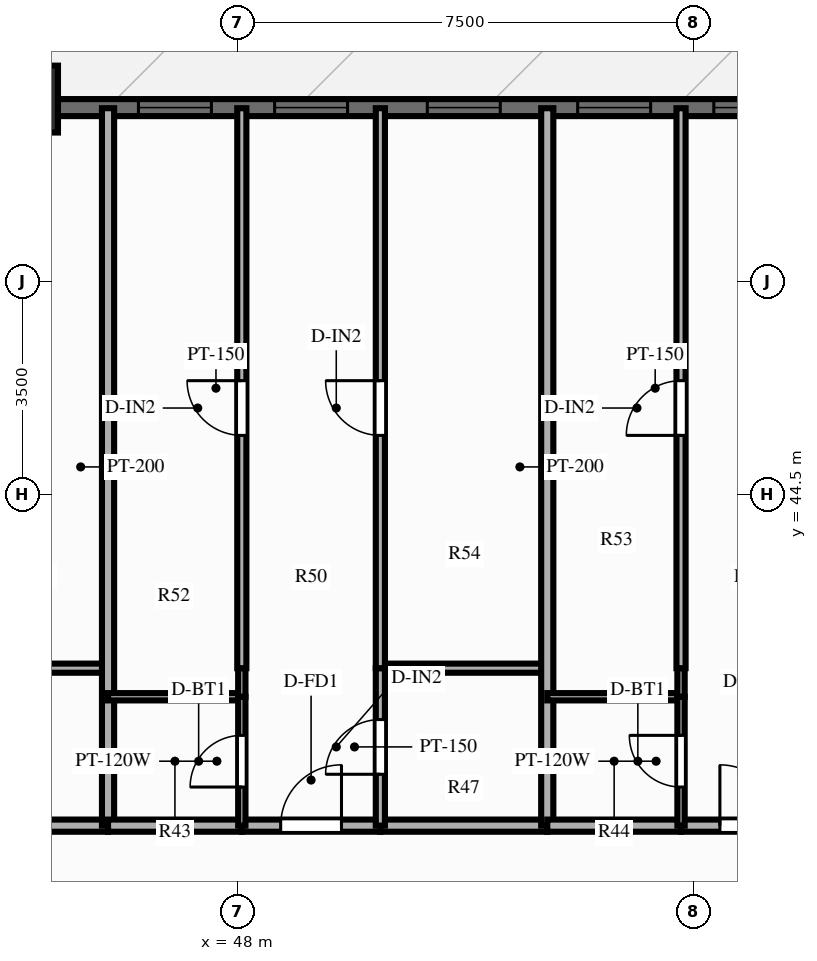
"""IFC4 building model, lengths in metres.
Left out: names, types, materials, properties, quantities, classifications, styles, units other than length and angle.
Written with IfcOpenShell. Run it as: python <this file> out.ifc"""

import sys

from ifc_helpers import new_model, si_unit, direction, frame, frame_2d, origin, origin_2d, place, context, subcontext, project, spatial, rectangle, extrude, source, transform, mapped, element, fill, save


model = new_model("IFC4")
c1 = context("Model", 3, precision=1e-05, world=origin(), true_north=direction((0.0, 1.0)))
c2 = subcontext(c1, "Body", "Model", "MODEL_VIEW")
j1 = project(units=[si_unit("LENGTHUNIT", "METRE"), si_unit("PLANEANGLEUNIT", "RADIAN")], contexts=[c1])
p1 = place(None, origin())
s1 = spatial("IfcSite", under=j1, at=p1, CompositionType="ELEMENT")
p2 = place(p1, origin())
s2 = spatial("IfcBuilding", under=s1, at=p2, CompositionType="ELEMENT")
p3 = place(p2, frame((0.0, 0.0, 25.4)))
s3 = spatial("IfcBuildingStorey", under=s2, at=p3, CompositionType="ELEMENT", Elevation=25.4)
m1 = source(origin(), c2, "Body", "SweptSolid", [
    extrude(rectangle(XDim=1.1, YDim=1.1, at=origin_2d()), origin(), (0.0, 0.0, 1.0), 3.0),
])
p4 = place(p3, frame((44.5, 51.0, 0.0), z_axis=(0.0, 0.0, 1.0), x_axis=(1.0, 0.0, 0.0)))
e1 = element("IfcColumn", 1, at=p4, inside=s3, PredefinedType="COLUMN", context=c2, shape_type="MappedRepresentation", body=[
    mapped(m1, transform((0.0, 0.0, 0.0), scale=1.0)),
])
p5 = place(p3, frame((15.5, 50.86, 0.0), z_axis=(0.0, 0.0, 1.0), x_axis=(1.0, 0.0, 0.0)))
e2 = element("IfcWall", 2, at=p5, inside=s3, PredefinedType="SOLIDWALL", context=c2, shape_type="SweptSolid", body=[
    extrude(rectangle(XDim=45.0, YDim=0.28, at=frame_2d((22.5, 0.0))), origin(), (0.0, 0.0, 1.0), 2.28),
])
p6 = place(p5, frame((0.76, 0.0, 0.25)))
e3 = element("IfcOpeningElement", 3, at=p6, cuts=e2, PredefinedType="OPENING", context=c2, shape_type="SweptSolid", body=[
    extrude(rectangle(XDim=1.2, YDim=1.5, at=frame_2d((0.6, 0.75))), frame((0.0, 0.152, 0.0), z_axis=(0.0, -1.0, 0.0), x_axis=(1.0, 0.0, 0.0)), (0.0, 0.0, 1.0), 0.304),
])
p7 = place(p5, frame((3.494, 0.0, 0.25)))
e4 = element("IfcOpeningElement", 4, at=p7, cuts=e2, PredefinedType="OPENING", context=c2, shape_type="SweptSolid", body=[
    extrude(rectangle(XDim=1.2, YDim=1.5, at=frame_2d((0.6, 0.75))), frame((0.0, 0.152, 0.0), z_axis=(0.0, -1.0, 0.0), x_axis=(1.0, 0.0, 0.0)), (0.0, 0.0, 1.0), 0.304),
])
p8 = place(p5, frame((8.741, 0.0, 0.25)))
e5 = element("IfcOpeningElement", 5, at=p8, cuts=e2, PredefinedType="OPENING", context=c2, shape_type="SweptSolid", body=[
    extrude(rectangle(XDim=1.2, YDim=1.5, at=frame_2d((0.6, 0.75))), frame((0.0, 0.152, 0.0), z_axis=(0.0, -1.0, 0.0), x_axis=(1.0, 0.0, 0.0)), (0.0, 0.0, 1.0), 0.304),
])
p9 = place(p5, frame((13.616, 0.0, 0.25)))
e6 = element("IfcOpeningElement", 6, at=p9, cuts=e2, PredefinedType="OPENING", context=c2, shape_type="SweptSolid", body=[
    extrude(rectangle(XDim=1.2, YDim=1.5, at=frame_2d((0.6, 0.75))), frame((0.0, 0.152, 0.0), z_axis=(0.0, -1.0, 0.0), x_axis=(1.0, 0.0, 0.0)), (0.0, 0.0, 1.0), 0.304),
])
p10 = place(p5, frame((17.146, 0.0, 0.25)))
e7 = element("IfcOpeningElement", 7, at=p10, cuts=e2, PredefinedType="OPENING", context=c2, shape_type="SweptSolid", body=[
    extrude(rectangle(XDim=1.2, YDim=1.5, at=frame_2d((0.6, 0.75))), frame((0.0, 0.152, 0.0), z_axis=(0.0, -1.0, 0.0), x_axis=(1.0, 0.0, 0.0)), (0.0, 0.0, 1.0), 0.304),
])
p11 = place(p5, frame((22.423, 0.0, 0.0)))
e8 = element("IfcOpeningElement", 8, at=p11, cuts=e2, PredefinedType="OPENING", context=c2, shape_type="SweptSolid", body=[
    extrude(rectangle(XDim=1.1, YDim=2.15, at=frame_2d((0.55, 1.075))), frame((0.0, 0.152, 0.0), z_axis=(0.0, -1.0, 0.0), x_axis=(1.0, 0.0, 0.0)), (0.0, 0.0, 1.0), 0.304),
])
p12 = place(p5, frame((27.252, 0.0, 0.25)))
e9 = element("IfcOpeningElement", 9, at=p12, cuts=e2, PredefinedType="OPENING", context=c2, shape_type="SweptSolid", body=[
    extrude(rectangle(XDim=0.95, YDim=1.5, at=frame_2d((0.475, 0.75))), frame((0.0, 0.152, 0.0), z_axis=(0.0, -1.0, 0.0), x_axis=(1.0, 0.0, 0.0)), (0.0, 0.0, 1.0), 0.304),
])
p13 = place(p5, frame((30.873, 0.0, 0.25)))
e10 = element("IfcOpeningElement", 10, at=p13, cuts=e2, PredefinedType="OPENING", context=c2, shape_type="SweptSolid", body=[
    extrude(rectangle(XDim=1.2, YDim=1.5, at=frame_2d((0.6, 0.75))), frame((0.0, 0.152, 0.0), z_axis=(0.0, -1.0, 0.0), x_axis=(1.0, 0.0, 0.0)), (0.0, 0.0, 1.0), 0.304),
])
p14 = place(p5, frame((33.113, 0.0, 0.25)))
e11 = element("IfcOpeningElement", 11, at=p14, cuts=e2, PredefinedType="OPENING", context=c2, shape_type="SweptSolid", body=[
    extrude(rectangle(XDim=1.2, YDim=1.5, at=frame_2d((0.6, 0.75))), frame((0.0, 0.152, 0.0), z_axis=(0.0, -1.0, 0.0), x_axis=(1.0, 0.0, 0.0)), (0.0, 0.0, 1.0), 0.304),
])
p15 = place(p5, frame((35.624, 0.0, 0.25)))
e12 = element("IfcOpeningElement", 12, at=p15, cuts=e2, PredefinedType="OPENING", context=c2, shape_type="SweptSolid", body=[
    extrude(rectangle(XDim=1.2, YDim=1.5, at=frame_2d((0.6, 0.75))), frame((0.0, 0.152, 0.0), z_axis=(0.0, -1.0, 0.0), x_axis=(1.0, 0.0, 0.0)), (0.0, 0.0, 1.0), 0.304),
])
p16 = place(p5, frame((38.097, 0.0, 0.25)))
e13 = element("IfcOpeningElement", 13, at=p16, cuts=e2, PredefinedType="OPENING", context=c2, shape_type="SweptSolid", body=[
    extrude(rectangle(XDim=1.2, YDim=1.5, at=frame_2d((0.6, 0.75))), frame((0.0, 0.152, 0.0), z_axis=(0.0, -1.0, 0.0), x_axis=(1.0, 0.0, 0.0)), (0.0, 0.0, 1.0), 0.304),
])
p17 = place(p5, frame((40.336, 0.0, 0.25)))
e14 = element("IfcOpeningElement", 14, at=p17, cuts=e2, PredefinedType="OPENING", context=c2, shape_type="SweptSolid", body=[
    extrude(rectangle(XDim=1.2, YDim=1.5, at=frame_2d((0.6, 0.75))), frame((0.0, 0.152, 0.0), z_axis=(0.0, -1.0, 0.0), x_axis=(1.0, 0.0, 0.0)), (0.0, 0.0, 1.0), 0.304),
])
p18 = place(p5, frame((42.743, 0.0, 0.25)))
e15 = element("IfcOpeningElement", 15, at=p18, cuts=e2, PredefinedType="OPENING", context=c2, shape_type="SweptSolid", body=[
    extrude(rectangle(XDim=1.2, YDim=1.5, at=frame_2d((0.6, 0.75))), frame((0.0, 0.152, 0.0), z_axis=(0.0, -1.0, 0.0), x_axis=(1.0, 0.0, 0.0)), (0.0, 0.0, 1.0), 0.304),
])
p19 = place(p3, frame((42.344, 39.05, 0.0), z_axis=(0.0, 0.0, 1.0), x_axis=(1.0, 0.0, 0.0)))
e16 = element("IfcWall", 16, at=p19, inside=s3, PredefinedType="PARTITIONING", context=c2, shape_type="SweptSolid", body=[
    extrude(rectangle(XDim=3.529, YDim=0.2, at=frame_2d((1.764, 0.0))), origin(), (0.0, 0.0, 1.0), 2.79),
])
p20 = place(p3, frame((42.344, 41.64, 0.0), z_axis=(0.0, 0.0, 1.0), x_axis=(1.0, 0.0, 0.0)))
e17 = element("IfcWall", 17, at=p20, inside=s3, PredefinedType="PARTITIONING", context=c2, shape_type="SweptSolid", body=[
    extrude(rectangle(XDim=3.529, YDim=0.15, at=frame_2d((1.764, 0.0))), origin(), (0.0, 0.0, 1.0), 2.79),
])
p21 = place(p3, frame((45.873, 39.05, 0.0), z_axis=(0.0, 0.0, 1.0), x_axis=(0.0, 1.0, 0.0)))
e18 = element("IfcWall", 18, at=p21, inside=s3, PredefinedType="PARTITIONING", context=c2, shape_type="SweptSolid", body=[
    extrude(rectangle(XDim=11.8, YDim=0.2, at=frame_2d((5.9, 0.0))), origin(), (0.0, 0.0, 1.0), 2.79),
])
p22 = place(p3, frame((45.873, 39.05, 0.0), z_axis=(0.0, 0.0, 1.0), x_axis=(1.0, 0.0, 0.0)))
e19 = element("IfcWall", 19, at=p22, inside=s3, PredefinedType="PARTITIONING", context=c2, shape_type="SweptSolid", body=[
    extrude(rectangle(XDim=2.2, YDim=0.2, at=frame_2d((1.1, 0.0))), origin(), (0.0, 0.0, 1.0), 2.79),
])
p23 = place(p3, frame((48.073, 39.05, 0.0), z_axis=(0.0, 0.0, 1.0), x_axis=(1.0, 0.0, 0.0)))
e20 = element("IfcWall", 20, at=p23, inside=s3, PredefinedType="PARTITIONING", context=c2, shape_type="SweptSolid", body=[
    extrude(rectangle(XDim=2.278, YDim=0.2, at=frame_2d((1.139, 0.0))), origin(), (0.0, 0.0, 1.0), 2.79),
])
p24 = place(p23, frame((0.639, 0.0, 0.0)))
e21 = element("IfcOpeningElement", 21, at=p24, cuts=e20, PredefinedType="OPENING", context=c2, shape_type="SweptSolid", body=[
    extrude(rectangle(XDim=1.0, YDim=2.15, at=frame_2d((0.5, 1.075))), frame((0.0, 0.112, 0.0), z_axis=(0.0, -1.0, 0.0), x_axis=(1.0, 0.0, 0.0)), (0.0, 0.0, 1.0), 0.224),
])
p25 = place(p3, frame((50.352, 39.05, 0.0), z_axis=(0.0, 0.0, 1.0), x_axis=(1.0, 0.0, 0.0)))
e22 = element("IfcWall", 22, at=p25, inside=s3, PredefinedType="PARTITIONING", context=c2, shape_type="SweptSolid", body=[
    extrude(rectangle(XDim=2.745, YDim=0.2, at=frame_2d((1.373, 0.0))), origin(), (0.0, 0.0, 1.0), 2.79),
])
p26 = place(p3, frame((45.873, 41.17, 0.0), z_axis=(0.0, 0.0, 1.0), x_axis=(1.0, 0.0, 0.0)))
e23 = element("IfcWall", 23, at=p26, inside=s3, PredefinedType="PARTITIONING", context=c2, shape_type="SweptSolid", body=[
    extrude(rectangle(XDim=2.2, YDim=0.12, at=frame_2d((1.1, 0.0))), origin(), (0.0, 0.0, 1.0), 2.79),
])
p27 = place(p3, frame((50.352, 41.64, 0.0), z_axis=(0.0, 0.0, 1.0), x_axis=(1.0, 0.0, 0.0)))
e24 = element("IfcWall", 24, at=p27, inside=s3, PredefinedType="PARTITIONING", context=c2, shape_type="SweptSolid", body=[
    extrude(rectangle(XDim=2.745, YDim=0.15, at=frame_2d((1.373, 0.0))), origin(), (0.0, 0.0, 1.0), 2.79),
])
p28 = place(p3, frame((48.073, 39.05, 0.0), z_axis=(0.0, 0.0, 1.0), x_axis=(0.0, 1.0, 0.0)))
e25 = element("IfcWall", 25, at=p28, inside=s3, PredefinedType="PARTITIONING", context=c2, shape_type="SweptSolid", body=[
    extrude(rectangle(XDim=2.12, YDim=0.12, at=frame_2d((1.06, 0.0))), origin(), (0.0, 0.0, 1.0), 2.79),
])
p29 = place(p28, frame((0.635, 0.0, 0.0)))
e26 = element("IfcOpeningElement", 26, at=p29, cuts=e25, PredefinedType="OPENING", context=c2, shape_type="SweptSolid", body=[
    extrude(rectangle(XDim=0.85, YDim=2.05, at=frame_2d((0.425, 1.025))), frame((0.0, 0.072, 0.0), z_axis=(0.0, -1.0, 0.0), x_axis=(1.0, 0.0, 0.0)), (0.0, 0.0, 1.0), 0.144),
])
p30 = place(p3, frame((48.073, 41.17, 0.0), z_axis=(0.0, 0.0, 1.0), x_axis=(0.0, 1.0, 0.0)))
e27 = element("IfcWall", 27, at=p30, inside=s3, PredefinedType="PARTITIONING", context=c2, shape_type="SweptSolid", body=[
    extrude(rectangle(XDim=0.47, YDim=0.12, at=frame_2d((0.235, 0.0))), origin(), (0.0, 0.0, 1.0), 2.79),
])
p31 = place(p3, frame((48.073, 41.64, 0.0), z_axis=(0.0, 0.0, 1.0), x_axis=(0.0, 1.0, 0.0)))
e28 = element("IfcWall", 28, at=p31, inside=s3, PredefinedType="PARTITIONING", context=c2, shape_type="SweptSolid", body=[
    extrude(rectangle(XDim=9.21, YDim=0.15, at=frame_2d((4.605, 0.0))), origin(), (0.0, 0.0, 1.0), 2.79),
])
p32 = place(p31, frame((3.829, 0.0, 0.0)))
e29 = element("IfcOpeningElement", 29, at=p32, cuts=e28, PredefinedType="OPENING", context=c2, shape_type="SweptSolid", body=[
    extrude(rectangle(XDim=0.9, YDim=2.1, at=frame_2d((0.45, 1.05))), frame((0.0, 0.087, 0.0), z_axis=(0.0, -1.0, 0.0), x_axis=(1.0, 0.0, 0.0)), (0.0, 0.0, 1.0), 0.174),
])
p33 = place(p3, frame((50.352, 39.05, 0.0), z_axis=(0.0, 0.0, 1.0), x_axis=(0.0, 1.0, 0.0)))
e30 = element("IfcWall", 30, at=p33, inside=s3, PredefinedType="PARTITIONING", context=c2, shape_type="SweptSolid", body=[
    extrude(rectangle(XDim=2.59, YDim=0.15, at=frame_2d((1.295, 0.0))), origin(), (0.0, 0.0, 1.0), 2.79),
])
p34 = place(p33, frame((0.845, 0.0, 0.0)))
e31 = element("IfcOpeningElement", 31, at=p34, cuts=e30, PredefinedType="OPENING", context=c2, shape_type="SweptSolid", body=[
    extrude(rectangle(XDim=0.9, YDim=2.1, at=frame_2d((0.45, 1.05))), frame((0.0, 0.087, 0.0), z_axis=(0.0, -1.0, 0.0), x_axis=(1.0, 0.0, 0.0)), (0.0, 0.0, 1.0), 0.174),
])
p35 = place(p3, frame((50.352, 41.64, 0.0), z_axis=(0.0, 0.0, 1.0), x_axis=(0.0, 1.0, 0.0)))
e32 = element("IfcWall", 32, at=p35, inside=s3, PredefinedType="PARTITIONING", context=c2, shape_type="SweptSolid", body=[
    extrude(rectangle(XDim=9.21, YDim=0.15, at=frame_2d((4.605, 0.0))), origin(), (0.0, 0.0, 1.0), 2.79),
])
p36 = place(p35, frame((3.829, 0.0, 0.0)))
e33 = element("IfcOpeningElement", 33, at=p36, cuts=e32, PredefinedType="OPENING", context=c2, shape_type="SweptSolid", body=[
    extrude(rectangle(XDim=0.9, YDim=2.1, at=frame_2d((0.45, 1.05))), frame((0.0, 0.087, 0.0), z_axis=(0.0, -1.0, 0.0), x_axis=(1.0, 0.0, 0.0)), (0.0, 0.0, 1.0), 0.174),
])
p37 = place(p3, frame((53.097, 39.05, 0.0), z_axis=(0.0, 0.0, 1.0), x_axis=(0.0, 1.0, 0.0)))
e34 = element("IfcWall", 34, at=p37, inside=s3, PredefinedType="PARTITIONING", context=c2, shape_type="SweptSolid", body=[
    extrude(rectangle(XDim=11.8, YDim=0.2, at=frame_2d((5.9, 0.0))), origin(), (0.0, 0.0, 1.0), 2.79),
])
p38 = place(p3, frame((53.097, 39.05, 0.0), z_axis=(0.0, 0.0, 1.0), x_axis=(1.0, 0.0, 0.0)))
e35 = element("IfcWall", 35, at=p38, inside=s3, PredefinedType="PARTITIONING", context=c2, shape_type="SweptSolid", body=[
    extrude(rectangle(XDim=2.2, YDim=0.2, at=frame_2d((1.1, 0.0))), origin(), (0.0, 0.0, 1.0), 2.79),
])
p39 = place(p3, frame((55.297, 39.05, 0.0), z_axis=(0.0, 0.0, 1.0), x_axis=(1.0, 0.0, 0.0)))
e36 = element("IfcWall", 36, at=p39, inside=s3, PredefinedType="PARTITIONING", context=c2, shape_type="SweptSolid", body=[
    extrude(rectangle(XDim=2.279, YDim=0.2, at=frame_2d((1.139, 0.0))), origin(), (0.0, 0.0, 1.0), 2.79),
])
p40 = place(p39, frame((0.639, 0.0, 0.0)))
e37 = element("IfcOpeningElement", 37, at=p40, cuts=e36, PredefinedType="OPENING", context=c2, shape_type="SweptSolid", body=[
    extrude(rectangle(XDim=1.0, YDim=2.15, at=frame_2d((0.5, 1.075))), frame((0.0, 0.112, 0.0), z_axis=(0.0, -1.0, 0.0), x_axis=(1.0, 0.0, 0.0)), (0.0, 0.0, 1.0), 0.224),
])
p41 = place(p3, frame((53.097, 41.17, 0.0), z_axis=(0.0, 0.0, 1.0), x_axis=(1.0, 0.0, 0.0)))
e38 = element("IfcWall", 38, at=p41, inside=s3, PredefinedType="PARTITIONING", context=c2, shape_type="SweptSolid", body=[
    extrude(rectangle(XDim=2.2, YDim=0.12, at=frame_2d((1.1, 0.0))), origin(), (0.0, 0.0, 1.0), 2.79),
])
p42 = place(p3, frame((55.297, 39.05, 0.0), z_axis=(0.0, 0.0, 1.0), x_axis=(0.0, 1.0, 0.0)))
e39 = element("IfcWall", 39, at=p42, inside=s3, PredefinedType="PARTITIONING", context=c2, shape_type="SweptSolid", body=[
    extrude(rectangle(XDim=2.12, YDim=0.12, at=frame_2d((1.06, 0.0))), origin(), (0.0, 0.0, 1.0), 2.79),
])
p43 = place(p42, frame((0.635, 0.0, 0.0)))
e40 = element("IfcOpeningElement", 40, at=p43, cuts=e39, PredefinedType="OPENING", context=c2, shape_type="SweptSolid", body=[
    extrude(rectangle(XDim=0.85, YDim=2.05, at=frame_2d((0.425, 1.025))), frame((0.0, 0.072, 0.0), z_axis=(0.0, -1.0, 0.0), x_axis=(1.0, 0.0, 0.0)), (0.0, 0.0, 1.0), 0.144),
])
p44 = place(p3, frame((55.297, 41.17, 0.0), z_axis=(0.0, 0.0, 1.0), x_axis=(0.0, 1.0, 0.0)))
e41 = element("IfcWall", 41, at=p44, inside=s3, PredefinedType="PARTITIONING", context=c2, shape_type="SweptSolid", body=[
    extrude(rectangle(XDim=0.47, YDim=0.12, at=frame_2d((0.235, 0.0))), origin(), (0.0, 0.0, 1.0), 2.79),
])
p45 = place(p3, frame((55.297, 41.64, 0.0), z_axis=(0.0, 0.0, 1.0), x_axis=(0.0, 1.0, 0.0)))
e42 = element("IfcWall", 42, at=p45, inside=s3, PredefinedType="PARTITIONING", context=c2, shape_type="SweptSolid", body=[
    extrude(rectangle(XDim=9.21, YDim=0.15, at=frame_2d((4.605, 0.0))), origin(), (0.0, 0.0, 1.0), 2.79),
])
p46 = place(p45, frame((3.829, 0.0, 0.0)))
e43 = element("IfcOpeningElement", 43, at=p46, cuts=e42, PredefinedType="OPENING", context=c2, shape_type="SweptSolid", body=[
    extrude(rectangle(XDim=0.9, YDim=2.1, at=frame_2d((0.45, 1.05))), frame((0.0, 0.087, 0.0), z_axis=(0.0, -1.0, 0.0), x_axis=(1.0, 0.0, 0.0)), (0.0, 0.0, 1.0), 0.174),
])
m2 = source(origin(), c2, "Body", "SweptSolid", [
    extrude(rectangle(XDim=1.2, YDim=1.5, at=frame_2d((0.6, 0.75))), frame((0.0, 0.03, 0.0), z_axis=(0.0, -1.0, 0.0), x_axis=(1.0, 0.0, 0.0)), (0.0, 0.0, 1.0), 0.06),
])
p47 = place(p13, origin())
e44 = element("IfcWindow", 44, at=p47, inside=s3, PartitioningType="SINGLE_PANEL", PredefinedType="WINDOW", context=c2, shape_type="MappedRepresentation", body=[
    mapped(m2, transform((0.0, 0.0, 0.0), scale=1.0)),
])
fill(e10, e44)
p48 = place(p14, origin())
e45 = element("IfcWindow", 45, at=p48, inside=s3, PartitioningType="SINGLE_PANEL", PredefinedType="WINDOW", context=c2, shape_type="MappedRepresentation", body=[
    mapped(m2, transform((0.0, 0.0, 0.0), scale=1.0)),
])
fill(e11, e45)
p49 = place(p15, origin())
e46 = element("IfcWindow", 46, at=p49, inside=s3, PartitioningType="SINGLE_PANEL", PredefinedType="WINDOW", context=c2, shape_type="MappedRepresentation", body=[
    mapped(m2, transform((0.0, 0.0, 0.0), scale=1.0)),
])
fill(e12, e46)
p50 = place(p16, origin())
e47 = element("IfcWindow", 47, at=p50, inside=s3, PartitioningType="SINGLE_PANEL", PredefinedType="WINDOW", context=c2, shape_type="MappedRepresentation", body=[
    mapped(m2, transform((0.0, 0.0, 0.0), scale=1.0)),
])
fill(e13, e47)
p51 = place(p17, origin())
e48 = element("IfcWindow", 48, at=p51, inside=s3, PartitioningType="SINGLE_PANEL", PredefinedType="WINDOW", context=c2, shape_type="MappedRepresentation", body=[
    mapped(m2, transform((0.0, 0.0, 0.0), scale=1.0)),
])
fill(e14, e48)
m3 = source(origin(), c2, "Body", "SweptSolid", [
    extrude(rectangle(XDim=1.0, YDim=2.15, at=frame_2d((0.5, 1.075))), frame((0.0, 0.025, 0.0), z_axis=(0.0, -1.0, 0.0), x_axis=(1.0, 0.0, 0.0)), (0.0, 0.0, 1.0), 0.05),
])
p52 = place(p24, origin())
e49 = element("IfcDoor", 49, at=p52, inside=s3, OperationType="SINGLE_SWING_RIGHT", PredefinedType="DOOR", context=c2, shape_type="MappedRepresentation", body=[
    mapped(m3, transform((0.0, 0.0, 0.0), scale=1.0)),
])
fill(e21, e49)
m4 = source(origin(), c2, "Body", "SweptSolid", [
    extrude(rectangle(XDim=0.85, YDim=2.05, at=frame_2d((0.425, 1.025))), frame((0.0, 0.025, 0.0), z_axis=(0.0, -1.0, 0.0), x_axis=(1.0, 0.0, 0.0)), (0.0, 0.0, 1.0), 0.05),
])
p53 = place(p29, origin())
e50 = element("IfcDoor", 50, at=p53, inside=s3, OperationType="SINGLE_SWING_LEFT", PredefinedType="DOOR", context=c2, shape_type="MappedRepresentation", body=[
    mapped(m4, transform((0.0, 0.0, 0.0), scale=1.0)),
])
fill(e26, e50)
m5 = source(origin(), c2, "Body", "SweptSolid", [
    extrude(rectangle(XDim=0.9, YDim=2.1, at=frame_2d((0.45, 1.05))), frame((0.0, 0.025, 0.0), z_axis=(0.0, -1.0, 0.0), x_axis=(1.0, 0.0, 0.0)), (0.0, 0.0, 1.0), 0.05),
])
p54 = place(p32, origin())
e51 = element("IfcDoor", 51, at=p54, inside=s3, OperationType="SINGLE_SWING_RIGHT", PredefinedType="DOOR", context=c2, shape_type="MappedRepresentation", body=[
    mapped(m5, transform((0.0, 0.0, 0.0), scale=1.0)),
])
fill(e29, e51)
p55 = place(p34, origin())
e52 = element("IfcDoor", 52, at=p55, inside=s3, OperationType="SINGLE_SWING_LEFT", PredefinedType="DOOR", context=c2, shape_type="MappedRepresentation", body=[
    mapped(m5, transform((0.0, 0.0, 0.0), scale=1.0)),
])
fill(e31, e52)
p56 = place(p36, origin())
e53 = element("IfcDoor", 53, at=p56, inside=s3, OperationType="SINGLE_SWING_RIGHT", PredefinedType="DOOR", context=c2, shape_type="MappedRepresentation", body=[
    mapped(m5, transform((0.0, 0.0, 0.0), scale=1.0)),
])
fill(e33, e53)
p57 = place(p40, origin())
e54 = element("IfcDoor", 54, at=p57, inside=s3, OperationType="SINGLE_SWING_LEFT", PredefinedType="DOOR", context=c2, shape_type="MappedRepresentation", body=[
    mapped(m3, transform((0.0, 0.0, 0.0), scale=1.0)),
])
fill(e37, e54)
p58 = place(p43, origin())
e55 = element("IfcDoor", 55, at=p58, inside=s3, OperationType="SINGLE_SWING_RIGHT", PredefinedType="DOOR", context=c2, shape_type="MappedRepresentation", body=[
    mapped(m4, transform((0.0, 0.0, 0.0), scale=1.0)),
])
fill(e40, e55)
p59 = place(p46, origin())
e56 = element("IfcDoor", 56, at=p59, inside=s3, OperationType="SINGLE_SWING_LEFT", PredefinedType="DOOR", context=c2, shape_type="MappedRepresentation", body=[
    mapped(m5, transform((0.0, 0.0, 0.0), scale=1.0)),
])
fill(e43, e56)
save(model, sys.argv[1])
